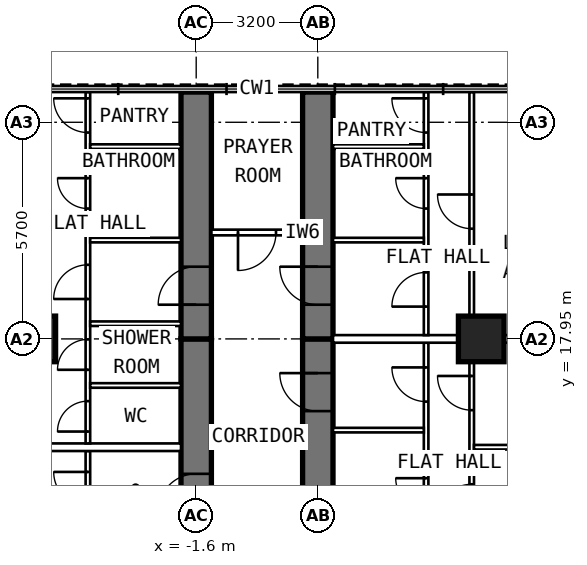
"""IFC4 building model, lengths in metres.
Left out: names, types, materials, properties, quantities, classifications, styles, units other than length and angle.
Written with IfcOpenShell. Run it as: python <this file> out.ifc"""

import sys

from ifc_helpers import new_model, si_unit, direction, frame, frame_2d, origin, origin_2d, place, context, subcontext, project, spatial, rectangle, extrude, element, fill, save


model = new_model("IFC4")
c1 = context("Model", 3, precision=1e-05, world=origin(), true_north=direction((0.0, 1.0)))
c2 = subcontext(c1, "Body", "Model", "MODEL_VIEW")
j1 = project(units=[si_unit("LENGTHUNIT", "METRE"), si_unit("PLANEANGLEUNIT", "RADIAN")], contexts=[c1])
p1 = place(None, origin())
s1 = spatial("IfcSite", under=j1, at=p1, CompositionType="ELEMENT")
p2 = place(p1, origin())
s2 = spatial("IfcBuilding", under=s1, at=p2, CompositionType="ELEMENT")
p3 = place(p2, frame((0.0, 0.0, 161.6)))
s3 = spatial("IfcBuildingStorey", under=s2, at=p3, CompositionType="ELEMENT", Elevation=161.6)
for number, where, z_axis, x_axis in (
    (1, (-5.9, 17.95, 0.0), (0.0, 0.0, 1.0), (0.0, 1.0, 0.0)),
    (2, (5.9, 17.95, 0.0), (0.0, 0.0, 1.0), (0.0, 1.0, 0.0)),
):
    element("IfcColumn", number, at=place(p3, frame(where, z_axis=z_axis, x_axis=x_axis)), inside=s3, PredefinedType="COLUMN", context=c2, shape_type="SweptSolid", body=[
        extrude(rectangle(XDim=1.2, YDim=1.2, at=origin_2d()), origin(), (0.0, 0.0, 1.0), 3.6),
    ])
p4 = place(p3, frame((-1.6, 9.6, 0.0), z_axis=(0.0, 0.0, 1.0), x_axis=(0.0, 1.0, 0.0)))
e3 = element("IfcWall", 3, at=p4, inside=s3, PredefinedType="SHEAR", context=c2, shape_type="SweptSolid", body=[
    extrude(rectangle(XDim=8.35, YDim=0.8, at=frame_2d((4.175, 0.0))), origin(), (0.0, 0.0, 1.0), 3.6),
])
p5 = place(p4, frame((3.8, 0.0, 0.0)))
e4 = element("IfcOpeningElement", 4, at=p5, cuts=e3, PredefinedType="OPENING", context=c2, shape_type="SweptSolid", body=[
    extrude(rectangle(XDim=1.0, YDim=2.1, at=frame_2d((0.5, 1.05))), frame((0.0, 0.412, 0.0), z_axis=(0.0, -1.0, 0.0), x_axis=(1.0, 0.0, 0.0)), (0.0, 0.0, 1.0), 0.824),
])
p6 = place(p3, frame((-1.6, 17.95, 0.0), z_axis=(0.0, 0.0, 1.0), x_axis=(0.0, 1.0, 0.0)))
e5 = element("IfcWall", 5, at=p6, inside=s3, PredefinedType="SHEAR", context=c2, shape_type="SweptSolid", body=[
    extrude(rectangle(XDim=6.495, YDim=0.8, at=frame_2d((3.248, 0.0))), origin(), (0.0, 0.0, 1.0), 3.6),
])
p7 = place(p6, frame((0.9, 0.0, 0.0)))
e6 = element("IfcOpeningElement", 6, at=p7, cuts=e5, PredefinedType="OPENING", context=c2, shape_type="SweptSolid", body=[
    extrude(rectangle(XDim=1.0, YDim=2.1, at=frame_2d((0.5, 1.05))), frame((0.0, 0.412, 0.0), z_axis=(0.0, -1.0, 0.0), x_axis=(1.0, 0.0, 0.0)), (0.0, 0.0, 1.0), 0.824),
])
p8 = place(p3, frame((1.6, 9.6, 0.0), z_axis=(0.0, 0.0, 1.0), x_axis=(0.0, 1.0, 0.0)))
e7 = element("IfcWall", 7, at=p8, inside=s3, PredefinedType="SHEAR", context=c2, shape_type="SweptSolid", body=[
    extrude(rectangle(XDim=8.35, YDim=0.8, at=frame_2d((4.175, 0.0))), origin(), (0.0, 0.0, 1.0), 3.6),
])
p9 = place(p8, frame((6.45, 0.0, 0.0)))
e8 = element("IfcOpeningElement", 8, at=p9, cuts=e7, PredefinedType="OPENING", context=c2, shape_type="SweptSolid", body=[
    extrude(rectangle(XDim=1.0, YDim=2.1, at=frame_2d((0.5, 1.05))), frame((0.0, 0.412, 0.0), z_axis=(0.0, -1.0, 0.0), x_axis=(1.0, 0.0, 0.0)), (0.0, 0.0, 1.0), 0.824),
])
p10 = place(p3, frame((1.6, 17.95, 0.0), z_axis=(0.0, 0.0, 1.0), x_axis=(0.0, 1.0, 0.0)))
e9 = element("IfcWall", 9, at=p10, inside=s3, PredefinedType="SHEAR", context=c2, shape_type="SweptSolid", body=[
    extrude(rectangle(XDim=6.495, YDim=0.8, at=frame_2d((3.248, 0.0))), origin(), (0.0, 0.0, 1.0), 3.6),
])
p11 = place(p10, frame((0.9, 0.0, 0.0)))
e10 = element("IfcOpeningElement", 10, at=p11, cuts=e9, PredefinedType="OPENING", context=c2, shape_type="SweptSolid", body=[
    extrude(rectangle(XDim=1.0, YDim=2.1, at=frame_2d((0.5, 1.05))), frame((0.0, 0.412, 0.0), z_axis=(0.0, -1.0, 0.0), x_axis=(1.0, 0.0, 0.0)), (0.0, 0.0, 1.0), 0.824),
])
p12 = place(p3, frame((-4.45, 10.05, 0.0), z_axis=(0.0, 0.0, 1.0), x_axis=(0.0, 1.0, 0.0)))
e11 = element("IfcWall", 11, at=p12, inside=s3, PredefinedType="PARTITIONING", context=c2, shape_type="SweptSolid", body=[
    extrude(rectangle(XDim=4.95, YDim=0.12, at=frame_2d((2.475, 0.0))), origin(), (0.0, 0.0, 1.0), 3.35),
])
p13 = place(p12, frame((1.6, 0.0, 0.0)))
e12 = element("IfcOpeningElement", 12, at=p13, cuts=e11, PredefinedType="OPENING", context=c2, shape_type="SweptSolid", body=[
    extrude(rectangle(XDim=0.8, YDim=2.1, at=frame_2d((0.4, 1.05))), frame((0.0, 0.072, 0.0), z_axis=(0.0, -1.0, 0.0), x_axis=(1.0, 0.0, 0.0)), (0.0, 0.0, 1.0), 0.144),
])
p14 = place(p12, frame((3.5, 0.0, 0.0)))
e13 = element("IfcOpeningElement", 13, at=p14, cuts=e11, PredefinedType="OPENING", context=c2, shape_type="SweptSolid", body=[
    extrude(rectangle(XDim=0.9, YDim=2.1, at=frame_2d((0.45, 1.05))), frame((0.0, 0.072, 0.0), z_axis=(0.0, -1.0, 0.0), x_axis=(1.0, 0.0, 0.0)), (0.0, 0.0, 1.0), 0.144),
])
p15 = place(p3, frame((-4.45, 15.2, 0.0), z_axis=(0.0, 0.0, 1.0), x_axis=(0.0, 1.0, 0.0)))
e14 = element("IfcWall", 14, at=p15, inside=s3, PredefinedType="PARTITIONING", context=c2, shape_type="SweptSolid", body=[
    extrude(rectangle(XDim=9.245, YDim=0.12, at=frame_2d((4.623, 0.0))), origin(), (0.0, 0.0, 1.0), 3.35),
])
p16 = place(p15, frame((0.312, 0.0, 0.0)))
e15 = element("IfcOpeningElement", 15, at=p16, cuts=e14, PredefinedType="OPENING", context=c2, shape_type="SweptSolid", body=[
    extrude(rectangle(XDim=0.8, YDim=2.1, at=frame_2d((0.4, 1.05))), frame((0.0, 0.072, 0.0), z_axis=(0.0, -1.0, 0.0), x_axis=(1.0, 0.0, 0.0)), (0.0, 0.0, 1.0), 0.144),
])
p17 = place(p15, frame((1.938, 0.0, 0.0)))
e16 = element("IfcOpeningElement", 16, at=p17, cuts=e14, PredefinedType="OPENING", context=c2, shape_type="SweptSolid", body=[
    extrude(rectangle(XDim=0.8, YDim=2.1, at=frame_2d((0.4, 1.05))), frame((0.0, 0.072, 0.0), z_axis=(0.0, -1.0, 0.0), x_axis=(1.0, 0.0, 0.0)), (0.0, 0.0, 1.0), 0.144),
])
p18 = place(p15, frame((3.8, 0.0, 0.0)))
e17 = element("IfcOpeningElement", 17, at=p18, cuts=e14, PredefinedType="OPENING", context=c2, shape_type="SweptSolid", body=[
    extrude(rectangle(XDim=0.9, YDim=2.1, at=frame_2d((0.45, 1.05))), frame((0.0, 0.072, 0.0), z_axis=(0.0, -1.0, 0.0), x_axis=(1.0, 0.0, 0.0)), (0.0, 0.0, 1.0), 0.144),
])
p19 = place(p15, frame((6.18, 0.0, 0.0)))
e18 = element("IfcOpeningElement", 18, at=p19, cuts=e14, PredefinedType="OPENING", context=c2, shape_type="SweptSolid", body=[
    extrude(rectangle(XDim=0.8, YDim=2.1, at=frame_2d((0.4, 1.05))), frame((0.0, 0.072, 0.0), z_axis=(0.0, -1.0, 0.0), x_axis=(1.0, 0.0, 0.0)), (0.0, 0.0, 1.0), 0.144),
])
p20 = place(p15, frame((8.18, 0.0, 0.0)))
e19 = element("IfcOpeningElement", 19, at=p20, cuts=e14, PredefinedType="OPENING", context=c2, shape_type="SweptSolid", body=[
    extrude(rectangle(XDim=0.9, YDim=2.1, at=frame_2d((0.45, 1.05))), frame((0.0, 0.072, 0.0), z_axis=(0.0, -1.0, 0.0), x_axis=(1.0, 0.0, 0.0)), (0.0, 0.0, 1.0), 0.144),
])
for number, where, z_axis, x_axis in (
    (20, (-2.0, 16.725, 0.0), (0.0, 0.0, 1.0), (-1.0, 0.0, 0.0)),
    (21, (-2.0, 18.35, 0.0), (0.0, 0.0, 1.0), (-1.0, 0.0, 0.0)),
    (22, (-2.0, 20.55, 0.0), (0.0, 0.0, 1.0), (-1.0, 0.0, 0.0)),
    (23, (-2.0, 23.01, 0.0), (0.0, 0.0, 1.0), (-1.0, 0.0, 0.0)),
):
    element("IfcWall", number, at=place(p3, frame(where, z_axis=z_axis, x_axis=x_axis)), inside=s3, PredefinedType="PARTITIONING", context=c2, shape_type="SweptSolid", body=[
        extrude(rectangle(XDim=2.39, YDim=0.12, at=frame_2d((1.195, 0.0))), origin(), (0.0, 0.0, 1.0), 3.35),
    ])
p21 = place(p3, frame((-2.0, 15.1, 0.0), z_axis=(0.0, 0.0, 1.0), x_axis=(-1.0, 0.0, 0.0)))
e24 = element("IfcWall", 24, at=p21, inside=s3, PredefinedType="PARTITIONING", context=c2, shape_type="SweptSolid", body=[
    extrude(rectangle(XDim=8.7, YDim=0.2, at=frame_2d((4.35, 0.0))), origin(), (0.0, 0.0, 1.0), 3.35),
])
p22 = place(p3, frame((4.45, 10.05, 0.0), z_axis=(0.0, 0.0, 1.0), x_axis=(0.0, 1.0, 0.0)))
e25 = element("IfcWall", 25, at=p22, inside=s3, PredefinedType="PARTITIONING", context=c2, shape_type="SweptSolid", body=[
    extrude(rectangle(XDim=7.8, YDim=0.12, at=frame_2d((3.9, 0.0))), origin(), (0.0, 0.0, 1.0), 3.35),
])
p23 = place(p22, frame((0.61, 0.0, 0.0)))
e26 = element("IfcOpeningElement", 26, at=p23, cuts=e25, PredefinedType="OPENING", context=c2, shape_type="SweptSolid", body=[
    extrude(rectangle(XDim=0.9, YDim=2.1, at=frame_2d((0.45, 1.05))), frame((0.0, 0.072, 0.0), z_axis=(0.0, -1.0, 0.0), x_axis=(1.0, 0.0, 0.0)), (0.0, 0.0, 1.0), 0.144),
])
p24 = place(p22, frame((3.435, 0.0, 0.0)))
e27 = element("IfcOpeningElement", 27, at=p24, cuts=e25, PredefinedType="OPENING", context=c2, shape_type="SweptSolid", body=[
    extrude(rectangle(XDim=0.8, YDim=2.1, at=frame_2d((0.4, 1.05))), frame((0.0, 0.072, 0.0), z_axis=(0.0, -1.0, 0.0), x_axis=(1.0, 0.0, 0.0)), (0.0, 0.0, 1.0), 0.144),
])
p25 = place(p22, frame((6.25, 0.0, 0.0)))
e28 = element("IfcOpeningElement", 28, at=p25, cuts=e25, PredefinedType="OPENING", context=c2, shape_type="SweptSolid", body=[
    extrude(rectangle(XDim=0.9, YDim=2.1, at=frame_2d((0.45, 1.05))), frame((0.0, 0.072, 0.0), z_axis=(0.0, -1.0, 0.0), x_axis=(1.0, 0.0, 0.0)), (0.0, 0.0, 1.0), 0.144),
])
p26 = place(p3, frame((5.65, 9.6, 0.0), z_axis=(0.0, 0.0, 1.0), x_axis=(0.0, 1.0, 0.0)))
e29 = element("IfcWall", 29, at=p26, inside=s3, PredefinedType="PARTITIONING", context=c2, shape_type="SweptSolid", body=[
    extrude(rectangle(XDim=8.1, YDim=0.12, at=frame_2d((4.05, 0.0))), origin(), (0.0, 0.0, 1.0), 3.35),
])
p27 = place(p26, frame((1.0, 0.0, 0.0)))
e30 = element("IfcOpeningElement", 30, at=p27, cuts=e29, PredefinedType="OPENING", context=c2, shape_type="SweptSolid", body=[
    extrude(rectangle(XDim=0.9, YDim=2.1, at=frame_2d((0.45, 1.05))), frame((0.0, 0.072, 0.0), z_axis=(0.0, -1.0, 0.0), x_axis=(1.0, 0.0, 0.0)), (0.0, 0.0, 1.0), 0.144),
])
p28 = place(p26, frame((3.625, 0.0, 0.0)))
e31 = element("IfcOpeningElement", 31, at=p28, cuts=e29, PredefinedType="OPENING", context=c2, shape_type="SweptSolid", body=[
    extrude(rectangle(XDim=0.9, YDim=2.1, at=frame_2d((0.45, 1.05))), frame((0.0, 0.072, 0.0), z_axis=(0.0, -1.0, 0.0), x_axis=(1.0, 0.0, 0.0)), (0.0, 0.0, 1.0), 0.144),
])
p29 = place(p26, frame((6.475, 0.0, 0.0)))
e32 = element("IfcOpeningElement", 32, at=p29, cuts=e29, PredefinedType="OPENING", context=c2, shape_type="SweptSolid", body=[
    extrude(rectangle(XDim=0.9, YDim=2.1, at=frame_2d((0.45, 1.05))), frame((0.0, 0.072, 0.0), z_axis=(0.0, -1.0, 0.0), x_axis=(1.0, 0.0, 0.0)), (0.0, 0.0, 1.0), 0.144),
])
p30 = place(p3, frame((5.71, 15.1, 0.0), z_axis=(0.0, 0.0, 1.0), x_axis=(1.0, 0.0, 0.0)))
e33 = element("IfcWall", 33, at=p30, inside=s3, PredefinedType="PARTITIONING", context=c2, shape_type="SweptSolid", body=[
    extrude(rectangle(XDim=4.99, YDim=0.12, at=frame_2d((2.495, 0.0))), origin(), (0.0, 0.0, 1.0), 3.35),
])
p31 = place(p3, frame((2.0, 15.55, 0.0), z_axis=(0.0, 0.0, 1.0), x_axis=(1.0, 0.0, 0.0)))
e34 = element("IfcWall", 34, at=p31, inside=s3, PredefinedType="PARTITIONING", context=c2, shape_type="SweptSolid", body=[
    extrude(rectangle(XDim=2.39, YDim=0.12, at=frame_2d((1.195, 0.0))), origin(), (0.0, 0.0, 1.0), 3.35),
])
p32 = place(p3, frame((4.45, 18.05, 0.0), z_axis=(0.0, 0.0, 1.0), x_axis=(0.0, 1.0, 0.0)))
e35 = element("IfcWall", 35, at=p32, inside=s3, PredefinedType="PARTITIONING", context=c2, shape_type="SweptSolid", body=[
    extrude(rectangle(XDim=6.395, YDim=0.12, at=frame_2d((3.198, 0.0))), origin(), (0.0, 0.0, 1.0), 3.35),
])
p33 = place(p32, frame((0.75, 0.0, 0.0)))
e36 = element("IfcOpeningElement", 36, at=p33, cuts=e35, PredefinedType="OPENING", context=c2, shape_type="SweptSolid", body=[
    extrude(rectangle(XDim=0.9, YDim=2.1, at=frame_2d((0.45, 1.05))), frame((0.0, 0.072, 0.0), z_axis=(0.0, -1.0, 0.0), x_axis=(1.0, 0.0, 0.0)), (0.0, 0.0, 1.0), 0.144),
])
p34 = place(p32, frame((3.33, 0.0, 0.0)))
e37 = element("IfcOpeningElement", 37, at=p34, cuts=e35, PredefinedType="OPENING", context=c2, shape_type="SweptSolid", body=[
    extrude(rectangle(XDim=0.8, YDim=2.1, at=frame_2d((0.4, 1.05))), frame((0.0, 0.072, 0.0), z_axis=(0.0, -1.0, 0.0), x_axis=(1.0, 0.0, 0.0)), (0.0, 0.0, 1.0), 0.144),
])
p35 = place(p32, frame((5.33, 0.0, 0.0)))
e38 = element("IfcOpeningElement", 38, at=p35, cuts=e35, PredefinedType="OPENING", context=c2, shape_type="SweptSolid", body=[
    extrude(rectangle(XDim=0.9, YDim=2.1, at=frame_2d((0.45, 1.05))), frame((0.0, 0.072, 0.0), z_axis=(0.0, -1.0, 0.0), x_axis=(1.0, 0.0, 0.0)), (0.0, 0.0, 1.0), 0.144),
])
p36 = place(p3, frame((5.65, 18.05, 0.0), z_axis=(0.0, 0.0, 1.0), x_axis=(0.0, 1.0, 0.0)))
e39 = element("IfcWall", 39, at=p36, inside=s3, PredefinedType="PARTITIONING", context=c2, shape_type="SweptSolid", body=[
    extrude(rectangle(XDim=6.395, YDim=0.12, at=frame_2d((3.198, 0.0))), origin(), (0.0, 0.0, 1.0), 3.35),
])
p37 = place(p36, frame((2.8, 0.0, 0.0)))
e40 = element("IfcOpeningElement", 40, at=p37, cuts=e39, PredefinedType="OPENING", context=c2, shape_type="SweptSolid", body=[
    extrude(rectangle(XDim=0.9, YDim=2.1, at=frame_2d((0.45, 1.05))), frame((0.0, 0.072, 0.0), z_axis=(0.0, -1.0, 0.0), x_axis=(1.0, 0.0, 0.0)), (0.0, 0.0, 1.0), 0.144),
])
for number, where, z_axis, x_axis in (
    (41, (2.0, 20.55, 0.0), (0.0, 0.0, 1.0), (1.0, 0.0, 0.0)),
    (42, (2.0, 23.01, 0.0), (0.0, 0.0, 1.0), (1.0, 0.0, 0.0)),
):
    element("IfcWall", number, at=place(p3, frame(where, z_axis=z_axis, x_axis=x_axis)), inside=s3, PredefinedType="PARTITIONING", context=c2, shape_type="SweptSolid", body=[
        extrude(rectangle(XDim=2.39, YDim=0.12, at=frame_2d((1.195, 0.0))), origin(), (0.0, 0.0, 1.0), 3.35),
    ])
p38 = place(p3, frame((2.0, 17.95, 0.0), z_axis=(0.0, 0.0, 1.0), x_axis=(1.0, 0.0, 0.0)))
e43 = element("IfcWall", 43, at=p38, inside=s3, PredefinedType="PARTITIONING", context=c2, shape_type="SweptSolid", body=[
    extrude(rectangle(XDim=8.7, YDim=0.2, at=frame_2d((4.35, 0.0))), origin(), (0.0, 0.0, 1.0), 2.45),
])
p39 = place(p3, frame((1.2, 20.75, 0.0), z_axis=(0.0, 0.0, 1.0), x_axis=(-1.0, 0.0, 0.0)))
e44 = element("IfcWall", 44, at=p39, inside=s3, PredefinedType="PARTITIONING", context=c2, shape_type="SweptSolid", body=[
    extrude(rectangle(XDim=2.4, YDim=0.15, at=frame_2d((1.2, 0.0))), origin(), (0.0, 0.0, 1.0), 3.35),
])
p40 = place(p39, frame((0.7, 0.0, 0.0)))
e45 = element("IfcOpeningElement", 45, at=p40, cuts=e44, PredefinedType="OPENING", context=c2, shape_type="SweptSolid", body=[
    extrude(rectangle(XDim=1.0, YDim=2.1, at=frame_2d((0.5, 1.05))), frame((0.0, 0.087, 0.0), z_axis=(0.0, -1.0, 0.0), x_axis=(1.0, 0.0, 0.0)), (0.0, 0.0, 1.0), 0.174),
])
p41 = place(p5, origin())
e46 = element("IfcDoor", 46, at=p41, inside=s3, OperationType="SINGLE_SWING_LEFT", PredefinedType="DOOR", context=c2, shape_type="SweptSolid", body=[
    extrude(rectangle(XDim=1.0, YDim=2.1, at=frame_2d((0.5, 1.05))), frame((0.0, 0.15, 0.0), z_axis=(0.0, -1.0, 0.0), x_axis=(1.0, 0.0, 0.0)), (0.0, 0.0, 1.0), 0.3),
])
fill(e4, e46)
p42 = place(p14, origin())
e47 = element("IfcDoor", 47, at=p42, inside=s3, OperationType="SINGLE_SWING_RIGHT", PredefinedType="DOOR", context=c2, shape_type="SweptSolid", body=[
    extrude(rectangle(XDim=0.9, YDim=2.1, at=frame_2d((0.45, 1.05))), frame((0.0, 0.025, 0.0), z_axis=(0.0, -1.0, 0.0), x_axis=(1.0, 0.0, 0.0)), (0.0, 0.0, 1.0), 0.05),
])
fill(e13, e47)
p43 = place(p7, origin())
e48 = element("IfcDoor", 48, at=p43, inside=s3, OperationType="SINGLE_SWING_LEFT", PredefinedType="DOOR", context=c2, shape_type="SweptSolid", body=[
    extrude(rectangle(XDim=1.0, YDim=2.1, at=frame_2d((0.5, 1.05))), frame((0.0, 0.15, 0.0), z_axis=(0.0, -1.0, 0.0), x_axis=(1.0, 0.0, 0.0)), (0.0, 0.0, 1.0), 0.3),
])
fill(e6, e48)
p44 = place(p16, origin())
e49 = element("IfcDoor", 49, at=p44, inside=s3, OperationType="SINGLE_SWING_LEFT", PredefinedType="DOOR", context=c2, shape_type="SweptSolid", body=[
    extrude(rectangle(XDim=0.8, YDim=2.1, at=frame_2d((0.4, 1.05))), frame((0.0, 0.025, 0.0), z_axis=(0.0, -1.0, 0.0), x_axis=(1.0, 0.0, 0.0)), (0.0, 0.0, 1.0), 0.05),
])
fill(e15, e49)
p45 = place(p17, origin())
e50 = element("IfcDoor", 50, at=p45, inside=s3, OperationType="SINGLE_SWING_LEFT", PredefinedType="DOOR", context=c2, shape_type="SweptSolid", body=[
    extrude(rectangle(XDim=0.8, YDim=2.1, at=frame_2d((0.4, 1.05))), frame((0.0, 0.025, 0.0), z_axis=(0.0, -1.0, 0.0), x_axis=(1.0, 0.0, 0.0)), (0.0, 0.0, 1.0), 0.05),
])
fill(e16, e50)
p46 = place(p18, origin())
e51 = element("IfcDoor", 51, at=p46, inside=s3, OperationType="SINGLE_SWING_LEFT", PredefinedType="DOOR", context=c2, shape_type="SweptSolid", body=[
    extrude(rectangle(XDim=0.9, YDim=2.1, at=frame_2d((0.45, 1.05))), frame((0.0, 0.025, 0.0), z_axis=(0.0, -1.0, 0.0), x_axis=(1.0, 0.0, 0.0)), (0.0, 0.0, 1.0), 0.05),
])
fill(e17, e51)
p47 = place(p19, origin())
e52 = element("IfcDoor", 52, at=p47, inside=s3, OperationType="SINGLE_SWING_RIGHT", PredefinedType="DOOR", context=c2, shape_type="SweptSolid", body=[
    extrude(rectangle(XDim=0.8, YDim=2.1, at=frame_2d((0.4, 1.05))), frame((0.0, 0.025, 0.0), z_axis=(0.0, -1.0, 0.0), x_axis=(1.0, 0.0, 0.0)), (0.0, 0.0, 1.0), 0.05),
])
fill(e18, e52)
p48 = place(p20, origin())
e53 = element("IfcDoor", 53, at=p48, inside=s3, OperationType="SINGLE_SWING_RIGHT", PredefinedType="DOOR", context=c2, shape_type="SweptSolid", body=[
    extrude(rectangle(XDim=0.9, YDim=2.1, at=frame_2d((0.45, 1.05))), frame((0.0, 0.025, 0.0), z_axis=(0.0, -1.0, 0.0), x_axis=(1.0, 0.0, 0.0)), (0.0, 0.0, 1.0), 0.05),
])
fill(e19, e53)
p49 = place(p9, origin())
e54 = element("IfcDoor", 54, at=p49, inside=s3, OperationType="SINGLE_SWING_RIGHT", PredefinedType="DOOR", context=c2, shape_type="SweptSolid", body=[
    extrude(rectangle(XDim=1.0, YDim=2.1, at=frame_2d((0.5, 1.05))), frame((0.0, 0.15, 0.0), z_axis=(0.0, -1.0, 0.0), x_axis=(1.0, 0.0, 0.0)), (0.0, 0.0, 1.0), 0.3),
])
fill(e8, e54)
p50 = place(p28, origin())
e55 = element("IfcDoor", 55, at=p50, inside=s3, OperationType="SINGLE_SWING_LEFT", PredefinedType="DOOR", context=c2, shape_type="SweptSolid", body=[
    extrude(rectangle(XDim=0.9, YDim=2.1, at=frame_2d((0.45, 1.05))), frame((0.0, 0.025, 0.0), z_axis=(0.0, -1.0, 0.0), x_axis=(1.0, 0.0, 0.0)), (0.0, 0.0, 1.0), 0.05),
])
fill(e31, e55)
p51 = place(p29, origin())
e56 = element("IfcDoor", 56, at=p51, inside=s3, OperationType="SINGLE_SWING_RIGHT", PredefinedType="DOOR", context=c2, shape_type="SweptSolid", body=[
    extrude(rectangle(XDim=0.9, YDim=2.1, at=frame_2d((0.45, 1.05))), frame((0.0, 0.025, 0.0), z_axis=(0.0, -1.0, 0.0), x_axis=(1.0, 0.0, 0.0)), (0.0, 0.0, 1.0), 0.05),
])
fill(e32, e56)
p52 = place(p24, origin())
e57 = element("IfcDoor", 57, at=p52, inside=s3, OperationType="SINGLE_SWING_RIGHT", PredefinedType="DOOR", context=c2, shape_type="SweptSolid", body=[
    extrude(rectangle(XDim=0.8, YDim=2.1, at=frame_2d((0.4, 1.05))), frame((0.0, 0.025, 0.0), z_axis=(0.0, -1.0, 0.0), x_axis=(1.0, 0.0, 0.0)), (0.0, 0.0, 1.0), 0.05),
])
fill(e27, e57)
p53 = place(p25, origin())
e58 = element("IfcDoor", 58, at=p53, inside=s3, OperationType="SINGLE_SWING_RIGHT", PredefinedType="DOOR", context=c2, shape_type="SweptSolid", body=[
    extrude(rectangle(XDim=0.9, YDim=2.1, at=frame_2d((0.45, 1.05))), frame((0.0, 0.025, 0.0), z_axis=(0.0, -1.0, 0.0), x_axis=(1.0, 0.0, 0.0)), (0.0, 0.0, 1.0), 0.05),
])
fill(e28, e58)
p54 = place(p11, origin())
e59 = element("IfcDoor", 59, at=p54, inside=s3, OperationType="SINGLE_SWING_RIGHT", PredefinedType="DOOR", context=c2, shape_type="SweptSolid", body=[
    extrude(rectangle(XDim=1.0, YDim=2.1, at=frame_2d((0.5, 1.05))), frame((0.0, 0.15, 0.0), z_axis=(0.0, -1.0, 0.0), x_axis=(1.0, 0.0, 0.0)), (0.0, 0.0, 1.0), 0.3),
])
fill(e10, e59)
p55 = place(p37, origin())
e60 = element("IfcDoor", 60, at=p55, inside=s3, OperationType="SINGLE_SWING_RIGHT", PredefinedType="DOOR", context=c2, shape_type="SweptSolid", body=[
    extrude(rectangle(XDim=0.9, YDim=2.1, at=frame_2d((0.45, 1.05))), frame((0.0, 0.025, 0.0), z_axis=(0.0, -1.0, 0.0), x_axis=(1.0, 0.0, 0.0)), (0.0, 0.0, 1.0), 0.05),
])
fill(e40, e60)
p56 = place(p33, origin())
e61 = element("IfcDoor", 61, at=p56, inside=s3, OperationType="SINGLE_SWING_LEFT", PredefinedType="DOOR", context=c2, shape_type="SweptSolid", body=[
    extrude(rectangle(XDim=0.9, YDim=2.1, at=frame_2d((0.45, 1.05))), frame((0.0, 0.025, 0.0), z_axis=(0.0, -1.0, 0.0), x_axis=(1.0, 0.0, 0.0)), (0.0, 0.0, 1.0), 0.05),
])
fill(e36, e61)
p57 = place(p34, origin())
e62 = element("IfcDoor", 62, at=p57, inside=s3, OperationType="SINGLE_SWING_RIGHT", PredefinedType="DOOR", context=c2, shape_type="SweptSolid", body=[
    extrude(rectangle(XDim=0.8, YDim=2.1, at=frame_2d((0.4, 1.05))), frame((0.0, 0.025, 0.0), z_axis=(0.0, -1.0, 0.0), x_axis=(1.0, 0.0, 0.0)), (0.0, 0.0, 1.0), 0.05),
])
fill(e37, e62)
p58 = place(p35, origin())
e63 = element("IfcDoor", 63, at=p58, inside=s3, OperationType="SINGLE_SWING_RIGHT", PredefinedType="DOOR", context=c2, shape_type="SweptSolid", body=[
    extrude(rectangle(XDim=0.9, YDim=2.1, at=frame_2d((0.45, 1.05))), frame((0.0, 0.025, 0.0), z_axis=(0.0, -1.0, 0.0), x_axis=(1.0, 0.0, 0.0)), (0.0, 0.0, 1.0), 0.05),
])
fill(e38, e63)
p59 = place(p40, origin())
e64 = element("IfcDoor", 64, at=p59, inside=s3, OperationType="SINGLE_SWING_RIGHT", PredefinedType="DOOR", context=c2, shape_type="SweptSolid", body=[
    extrude(rectangle(XDim=1.0, YDim=2.1, at=frame_2d((0.5, 1.05))), frame((0.0, 0.025, 0.0), z_axis=(0.0, -1.0, 0.0), x_axis=(1.0, 0.0, 0.0)), (0.0, 0.0, 1.0), 0.05),
])
fill(e45, e64)
save(model, sys.argv[1])
